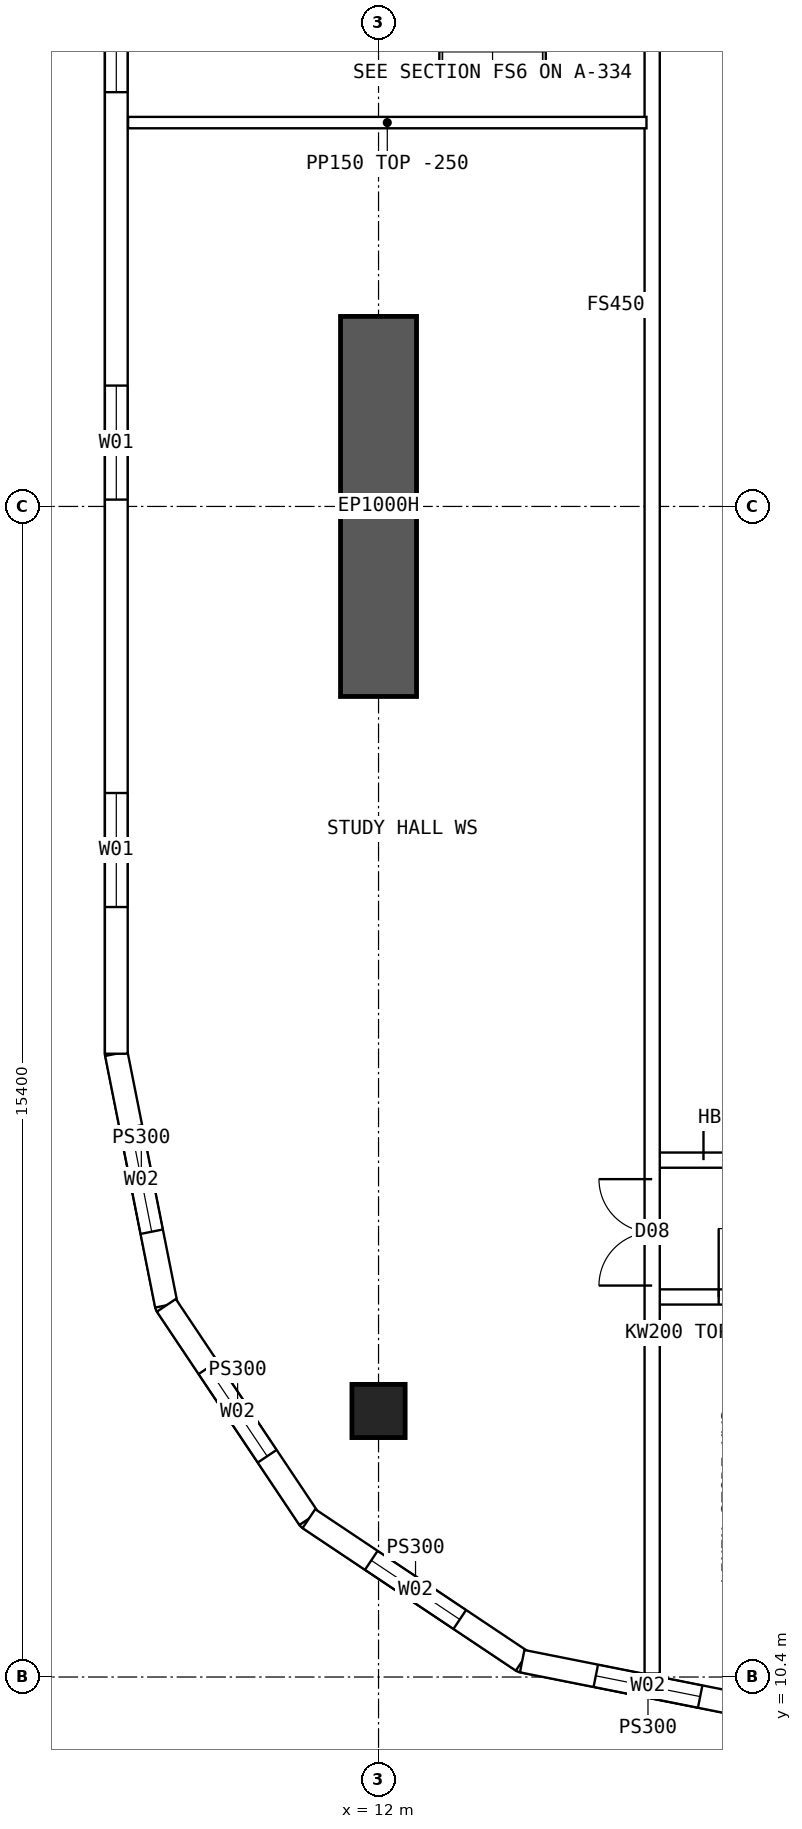
"""IFC4 building model, lengths in metres.
Left out: names, types, materials, properties, quantities, classifications, styles, units other than length and angle.
Written with IfcOpenShell. Run it as: python <this file> out.ifc"""

import sys

from ifc_helpers import new_model, si_unit, direction, frame, frame_2d, origin, origin_2d, place, context, subcontext, project, spatial, polyline, rectangle, hollow_rectangle, outline, extrude, element, fill, save


model = new_model("IFC4")
c1 = context("Model", 3, precision=1e-05, world=origin(), true_north=direction((0.0, 1.0)))
c2 = subcontext(c1, "Body", "Model", "MODEL_VIEW")
j1 = project(units=[si_unit("LENGTHUNIT", "METRE"), si_unit("PLANEANGLEUNIT", "RADIAN")], contexts=[c1])
p1 = place(None, origin())
s1 = spatial("IfcSite", under=j1, at=p1, CompositionType="ELEMENT")
p2 = place(p1, origin())
s2 = spatial("IfcBuilding", under=s1, at=p2, CompositionType="ELEMENT")
p3 = place(p2, frame((0.0, 0.0, 193.6)))
s3 = spatial("IfcBuildingStorey", under=s2, at=p3, CompositionType="ELEMENT", Elevation=193.6)
p4 = place(p3, frame((12.0, 13.9, 0.0), z_axis=(0.0, 0.0, 1.0), x_axis=(1.0, 0.0, 0.0)))
e1 = element("IfcColumn", 1, at=p4, inside=s3, PredefinedType="COLUMN", context=c2, shape_type="SweptSolid", body=[
    extrude(hollow_rectangle(XDim=0.7, YDim=0.7, WallThickness=0.07, at=origin_2d()), origin(), (0.0, 0.0, 1.0), 3.75),
])
p5 = place(p3, frame((12.0, 23.3, 0.0), z_axis=(0.0, 0.0, 1.0), x_axis=(0.0, 1.0, 0.0)))
e2 = element("IfcWall", 2, at=p5, inside=s3, PredefinedType="SHEAR", context=c2, shape_type="SweptSolid", body=[
    extrude(rectangle(XDim=5.0, YDim=1.0, at=frame_2d((2.5, 0.0))), origin(), (0.0, 0.0, 1.0), 3.75),
])
p6 = place(p3, frame((8.55, 45.4, 0.0), z_axis=(0.0, 0.0, 1.0), x_axis=(0.0, -1.0, 0.0)))
e3 = element("IfcWall", 3, at=p6, inside=s3, PredefinedType="SOLIDWALL", context=c2, shape_type="SweptSolid", body=[
    extrude(outline(polyline([(-0.015, -0.15), (26.815, -0.15), (26.785, 0.15), (0.015, 0.15), (-0.015, -0.15)])), origin(), (0.0, 0.0, 1.0), 3.5),
])
p7 = place(p6, frame((1.93, 0.0, 0.9)))
e4 = element("IfcOpeningElement", 4, at=p7, cuts=e3, PredefinedType="OPENING", context=c2, shape_type="SweptSolid", body=[
    extrude(rectangle(XDim=1.5, YDim=2.0, at=frame_2d((0.75, 1.0))), frame((0.0, 0.16, 0.0), z_axis=(0.0, -1.0, 0.0), x_axis=(1.0, 0.0, 0.0)), (0.0, 0.0, 1.0), 0.32),
])
p8 = place(p6, frame((7.29, 0.0, 0.9)))
e5 = element("IfcOpeningElement", 5, at=p8, cuts=e3, PredefinedType="OPENING", context=c2, shape_type="SweptSolid", body=[
    extrude(rectangle(XDim=1.5, YDim=2.0, at=frame_2d((0.75, 1.0))), frame((0.0, 0.16, 0.0), z_axis=(0.0, -1.0, 0.0), x_axis=(1.0, 0.0, 0.0)), (0.0, 0.0, 1.0), 0.32),
])
p9 = place(p6, frame((12.65, 0.0, 0.9)))
e6 = element("IfcOpeningElement", 6, at=p9, cuts=e3, PredefinedType="OPENING", context=c2, shape_type="SweptSolid", body=[
    extrude(rectangle(XDim=1.5, YDim=2.0, at=frame_2d((0.75, 1.0))), frame((0.0, 0.16, 0.0), z_axis=(0.0, -1.0, 0.0), x_axis=(1.0, 0.0, 0.0)), (0.0, 0.0, 1.0), 0.32),
])
p10 = place(p6, frame((18.01, 0.0, 0.9)))
e7 = element("IfcOpeningElement", 7, at=p10, cuts=e3, PredefinedType="OPENING", context=c2, shape_type="SweptSolid", body=[
    extrude(rectangle(XDim=1.5, YDim=2.0, at=frame_2d((0.75, 1.0))), frame((0.0, 0.16, 0.0), z_axis=(0.0, -1.0, 0.0), x_axis=(1.0, 0.0, 0.0)), (0.0, 0.0, 1.0), 0.32),
])
p11 = place(p6, frame((23.37, 0.0, 0.9)))
e8 = element("IfcOpeningElement", 8, at=p11, cuts=e3, PredefinedType="OPENING", context=c2, shape_type="SweptSolid", body=[
    extrude(rectangle(XDim=1.5, YDim=2.0, at=frame_2d((0.75, 1.0))), frame((0.0, 0.16, 0.0), z_axis=(0.0, -1.0, 0.0), x_axis=(1.0, 0.0, 0.0)), (0.0, 0.0, 1.0), 0.32),
])
p12 = place(p3, frame((8.55, 18.6, 0.0), z_axis=(0.0, 0.0, 1.0), x_axis=(0.19508664885, -0.980786011034, 0.0)))
e9 = element("IfcWall", 9, at=p12, inside=s3, PredefinedType="SOLIDWALL", context=c2, shape_type="SweptSolid", body=[
    extrude(outline(polyline([(-0.015, -0.15), (3.405, -0.15), (3.345, 0.15), (0.015, 0.15), (-0.015, -0.15)])), origin(), (0.0, 0.0, 1.0), 3.5),
])
p13 = place(p12, frame((0.988, 0.0, 0.9)))
e10 = element("IfcOpeningElement", 10, at=p13, cuts=e9, PredefinedType="OPENING", context=c2, shape_type="SweptSolid", body=[
    extrude(rectangle(XDim=1.4, YDim=1.8, at=frame_2d((0.7, 0.9))), frame((0.0, 0.16, 0.0), z_axis=(0.0, -1.0, 0.0), x_axis=(1.0, 0.0, 0.0)), (0.0, 0.0, 1.0), 0.32),
])
p14 = place(p3, frame((9.208, 15.29, 0.0), z_axis=(0.0, 0.0, 1.0), x_axis=(0.555534554399, -0.831493450887, 0.0)))
e11 = element("IfcWall", 11, at=p14, inside=s3, PredefinedType="SOLIDWALL", context=c2, shape_type="SweptSolid", body=[
    extrude(outline(polyline([(-0.03, -0.15), (3.405, -0.15), (3.345, 0.15), (0.03, 0.15), (-0.03, -0.15)])), origin(), (0.0, 0.0, 1.0), 3.5),
])
p15 = place(p14, frame((0.988, 0.0, 0.9)))
e12 = element("IfcOpeningElement", 12, at=p15, cuts=e11, PredefinedType="OPENING", context=c2, shape_type="SweptSolid", body=[
    extrude(rectangle(XDim=1.4, YDim=1.8, at=frame_2d((0.7, 0.9))), frame((0.0, 0.16, 0.0), z_axis=(0.0, -1.0, 0.0), x_axis=(1.0, 0.0, 0.0)), (0.0, 0.0, 1.0), 0.32),
])
p16 = place(p3, frame((11.083, 12.483, 0.0), z_axis=(0.0, 0.0, 1.0), x_axis=(0.831493450887, -0.555534554399, 0.0)))
e13 = element("IfcWall", 13, at=p16, inside=s3, PredefinedType="SOLIDWALL", context=c2, shape_type="SweptSolid", body=[
    extrude(outline(polyline([(-0.03, -0.15), (3.405, -0.15), (3.345, 0.15), (0.03, 0.15), (-0.03, -0.15)])), origin(), (0.0, 0.0, 1.0), 3.5),
])
p17 = place(p16, frame((0.988, 0.0, 0.9)))
e14 = element("IfcOpeningElement", 14, at=p17, cuts=e13, PredefinedType="OPENING", context=c2, shape_type="SweptSolid", body=[
    extrude(rectangle(XDim=1.4, YDim=1.8, at=frame_2d((0.7, 0.9))), frame((0.0, 0.16, 0.0), z_axis=(0.0, -1.0, 0.0), x_axis=(1.0, 0.0, 0.0)), (0.0, 0.0, 1.0), 0.32),
])
p18 = place(p3, frame((13.89, 10.608, 0.0), z_axis=(0.0, 0.0, 1.0), x_axis=(0.98078325777, -0.195100490205, 0.0)))
e15 = element("IfcWall", 15, at=p18, inside=s3, PredefinedType="SOLIDWALL", context=c2, shape_type="SweptSolid", body=[
    extrude(outline(polyline([(-0.03, -0.15), (3.405, -0.15), (3.345, 0.15), (0.03, 0.15), (-0.03, -0.15)])), origin(), (0.0, 0.0, 1.0), 3.5),
])
p19 = place(p18, frame((0.988, 0.0, 0.9)))
e16 = element("IfcOpeningElement", 16, at=p19, cuts=e15, PredefinedType="OPENING", context=c2, shape_type="SweptSolid", body=[
    extrude(rectangle(XDim=1.4, YDim=1.8, at=frame_2d((0.7, 0.9))), frame((0.0, 0.16, 0.0), z_axis=(0.0, -1.0, 0.0), x_axis=(1.0, 0.0, 0.0)), (0.0, 0.0, 1.0), 0.32),
])
p20 = place(p3, frame((15.6, 15.4, 0.0), z_axis=(0.0, 0.0, 1.0), x_axis=(1.0, 0.0, 0.0)))
e17 = element("IfcWall", 17, at=p20, inside=s3, PredefinedType="SOLIDWALL", context=c2, shape_type="SweptSolid", body=[
    extrude(rectangle(XDim=1.975, YDim=0.2, at=frame_2d((0.987, 0.0))), origin(), (0.0, 0.0, 1.0), 3.5),
])
p21 = place(p20, frame((0.875, 0.0, 0.0)))
e18 = element("IfcOpeningElement", 18, at=p21, cuts=e17, PredefinedType="OPENING", context=c2, shape_type="SweptSolid", body=[
    extrude(rectangle(XDim=0.9, YDim=2.1, at=frame_2d((0.45, 1.05))), frame((0.0, 0.11, 0.0), z_axis=(0.0, -1.0, 0.0), x_axis=(1.0, 0.0, 0.0)), (0.0, 0.0, 1.0), 0.22),
])
p22 = place(p3, frame((15.6, 17.2, 0.0), z_axis=(0.0, 0.0, 1.0), x_axis=(1.0, 0.0, 0.0)))
e19 = element("IfcWall", 19, at=p22, inside=s3, PredefinedType="SOLIDWALL", context=c2, shape_type="SweptSolid", body=[
    extrude(rectangle(XDim=1.975, YDim=0.2, at=frame_2d((0.987, 0.0))), origin(), (0.0, 0.0, 1.0), 3.5),
])
p23 = place(p22, frame((0.675, 0.0, 0.0)))
e20 = element("IfcOpeningElement", 20, at=p23, cuts=e19, PredefinedType="OPENING", context=c2, shape_type="SweptSolid", body=[
    extrude(rectangle(XDim=1.2, YDim=2.1, at=frame_2d((0.6, 1.05))), frame((0.0, 0.11, 0.0), z_axis=(0.0, -1.0, 0.0), x_axis=(1.0, 0.0, 0.0)), (0.0, 0.0, 1.0), 0.22),
])
p24 = place(p3, frame((8.705, 30.85, 0.0), z_axis=(0.0, 0.0, 1.0), x_axis=(1.0, 0.0, 0.0)))
e21 = element("IfcWall", 21, at=p24, inside=s3, PredefinedType="PARTITIONING", context=c2, shape_type="SweptSolid", body=[
    extrude(outline(polyline([(0.0, 0.0), (6.82, 0.0), (6.82, 3.5), (3.597, 3.5), (3.595, 3.05), (2.997, 3.05), (2.995, 3.5), (0.0, 3.5), (0.0, 0.0)])), frame((0.0, 0.075, 0.0), z_axis=(0.0, -1.0, 0.0), x_axis=(1.0, 0.0, 0.0)), (0.0, 0.0, 1.0), 0.15),
])
p25 = place(p3, frame((15.6, 10.446, 0.0), z_axis=(0.0, 0.0, 1.0), x_axis=(0.0, 1.0, 0.0)))
e22 = element("IfcWall", 22, at=p25, inside=s3, PredefinedType="SOLIDWALL", context=c2, shape_type="SweptSolid", body=[
    extrude(rectangle(XDim=43.107, YDim=0.2, at=frame_2d((21.554, 0.0))), origin(), (0.0, 0.0, 1.0), 3.5),
])
p26 = place(p25, frame((5.104, 0.0, 0.0)))
e23 = element("IfcOpeningElement", 23, at=p26, cuts=e22, PredefinedType="OPENING", context=c2, shape_type="SweptSolid", body=[
    extrude(rectangle(XDim=1.4, YDim=2.1, at=frame_2d((0.7, 1.05))), frame((0.0, 0.11, 0.0), z_axis=(0.0, -1.0, 0.0), x_axis=(1.0, 0.0, 0.0)), (0.0, 0.0, 1.0), 0.22),
])
p27 = place(p25, frame((36.504, 0.0, 0.0)))
e24 = element("IfcOpeningElement", 24, at=p27, cuts=e22, PredefinedType="OPENING", context=c2, shape_type="SweptSolid", body=[
    extrude(rectangle(XDim=1.4, YDim=2.1, at=frame_2d((0.7, 1.05))), frame((0.0, 0.11, 0.0), z_axis=(0.0, -1.0, 0.0), x_axis=(1.0, 0.0, 0.0)), (0.0, 0.0, 1.0), 0.22),
])
p28 = place(p9, origin())
e25 = element("IfcWindow", 25, at=p28, inside=s3, PartitioningType="SINGLE_PANEL", PredefinedType="WINDOW", context=c2, shape_type="SweptSolid", body=[
    extrude(rectangle(XDim=1.5, YDim=2.0, at=frame_2d((0.75, 1.0))), frame((0.0, 0.03, 0.0), z_axis=(0.0, -1.0, 0.0), x_axis=(1.0, 0.0, 0.0)), (0.0, 0.0, 1.0), 0.06),
])
fill(e6, e25)
p29 = place(p10, origin())
e26 = element("IfcWindow", 26, at=p29, inside=s3, PartitioningType="SINGLE_PANEL", PredefinedType="WINDOW", context=c2, shape_type="SweptSolid", body=[
    extrude(rectangle(XDim=1.5, YDim=2.0, at=frame_2d((0.75, 1.0))), frame((0.0, 0.03, 0.0), z_axis=(0.0, -1.0, 0.0), x_axis=(1.0, 0.0, 0.0)), (0.0, 0.0, 1.0), 0.06),
])
fill(e7, e26)
p30 = place(p11, origin())
e27 = element("IfcWindow", 27, at=p30, inside=s3, PartitioningType="SINGLE_PANEL", PredefinedType="WINDOW", context=c2, shape_type="SweptSolid", body=[
    extrude(rectangle(XDim=1.5, YDim=2.0, at=frame_2d((0.75, 1.0))), frame((0.0, 0.03, 0.0), z_axis=(0.0, -1.0, 0.0), x_axis=(1.0, 0.0, 0.0)), (0.0, 0.0, 1.0), 0.06),
])
fill(e8, e27)
p31 = place(p13, origin())
e28 = element("IfcWindow", 28, at=p31, inside=s3, PartitioningType="SINGLE_PANEL", PredefinedType="WINDOW", context=c2, shape_type="SweptSolid", body=[
    extrude(rectangle(XDim=1.4, YDim=1.8, at=frame_2d((0.7, 0.9))), frame((0.0, 0.03, 0.0), z_axis=(0.0, -1.0, 0.0), x_axis=(1.0, 0.0, 0.0)), (0.0, 0.0, 1.0), 0.06),
])
fill(e10, e28)
p32 = place(p15, origin())
e29 = element("IfcWindow", 29, at=p32, inside=s3, PartitioningType="SINGLE_PANEL", PredefinedType="WINDOW", context=c2, shape_type="SweptSolid", body=[
    extrude(rectangle(XDim=1.4, YDim=1.8, at=frame_2d((0.7, 0.9))), frame((0.0, 0.03, 0.0), z_axis=(0.0, -1.0, 0.0), x_axis=(1.0, 0.0, 0.0)), (0.0, 0.0, 1.0), 0.06),
])
fill(e12, e29)
p33 = place(p17, origin())
e30 = element("IfcWindow", 30, at=p33, inside=s3, PartitioningType="SINGLE_PANEL", PredefinedType="WINDOW", context=c2, shape_type="SweptSolid", body=[
    extrude(rectangle(XDim=1.4, YDim=1.8, at=frame_2d((0.7, 0.9))), frame((0.0, 0.03, 0.0), z_axis=(0.0, -1.0, 0.0), x_axis=(1.0, 0.0, 0.0)), (0.0, 0.0, 1.0), 0.06),
])
fill(e14, e30)
p34 = place(p19, origin())
e31 = element("IfcWindow", 31, at=p34, inside=s3, PartitioningType="SINGLE_PANEL", PredefinedType="WINDOW", context=c2, shape_type="SweptSolid", body=[
    extrude(rectangle(XDim=1.4, YDim=1.8, at=frame_2d((0.7, 0.9))), frame((0.0, 0.03, 0.0), z_axis=(0.0, -1.0, 0.0), x_axis=(1.0, 0.0, 0.0)), (0.0, 0.0, 1.0), 0.06),
])
fill(e16, e31)
p35 = place(p23, origin())
e32 = element("IfcDoor", 32, at=p35, inside=s3, OperationType="DOUBLE_DOOR_SINGLE_SWING", PredefinedType="DOOR", context=c2, shape_type="SweptSolid", body=[
    extrude(rectangle(XDim=1.2, YDim=2.1, at=frame_2d((0.6, 1.05))), frame((0.0, 0.025, 0.0), z_axis=(0.0, -1.0, 0.0), x_axis=(1.0, 0.0, 0.0)), (0.0, 0.0, 1.0), 0.05),
])
fill(e20, e32)
p36 = place(p26, origin())
e33 = element("IfcDoor", 33, at=p36, inside=s3, OperationType="DOUBLE_DOOR_SINGLE_SWING", PredefinedType="DOOR", context=c2, shape_type="SweptSolid", body=[
    extrude(rectangle(XDim=1.4, YDim=2.1, at=frame_2d((0.7, 1.05))), frame((0.0, 0.025, 0.0), z_axis=(0.0, -1.0, 0.0), x_axis=(1.0, 0.0, 0.0)), (0.0, 0.0, 1.0), 0.05),
])
fill(e23, e33)
p37 = place(p21, origin())
e34 = element("IfcDoor", 34, at=p37, inside=s3, OperationType="SINGLE_SWING_LEFT", PredefinedType="DOOR", context=c2, shape_type="SweptSolid", body=[
    extrude(rectangle(XDim=0.9, YDim=2.1, at=frame_2d((0.45, 1.05))), frame((0.0, 0.025, 0.0), z_axis=(0.0, -1.0, 0.0), x_axis=(1.0, 0.0, 0.0)), (0.0, 0.0, 1.0), 0.05),
])
fill(e18, e34)
save(model, sys.argv[1])
